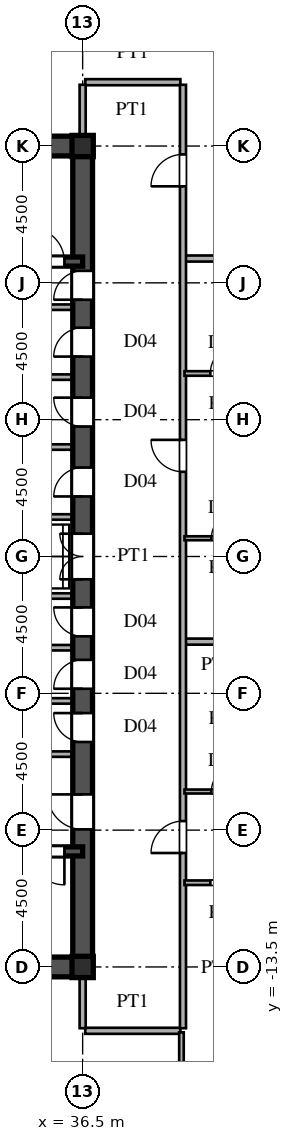
"""IFC4 building model, lengths in metres.
Left out: names, types, materials, properties, quantities, classifications, styles, units other than length and angle.
Written with IfcOpenShell. Run it as: python <this file> out.ifc"""

import sys

from ifc_helpers import new_model, si_unit, direction, frame, frame_2d, origin, origin_2d, place, context, subcontext, project, spatial, rectangle, i_section, extrude, source, transform, mapped, element, fill, save


model = new_model("IFC4")
c1 = context("Model", 3, precision=1e-05, world=origin(), true_north=direction((0.0, 1.0)))
c2 = subcontext(c1, "Body", "Model", "MODEL_VIEW")
j1 = project(units=[si_unit("LENGTHUNIT", "METRE"), si_unit("PLANEANGLEUNIT", "RADIAN")], contexts=[c1])
p1 = place(None, origin())
s1 = spatial("IfcSite", under=j1, at=p1, CompositionType="ELEMENT")
p2 = place(p1, origin())
s2 = spatial("IfcBuilding", under=s1, at=p2, CompositionType="ELEMENT")
p3 = place(p2, frame((0.0, 0.0, 124.8)))
s3 = spatial("IfcBuildingStorey", under=s2, at=p3, CompositionType="ELEMENT", Elevation=124.8)
m1 = source(origin(), c2, "Body", "SweptSolid", [
    extrude(i_section(OverallWidth=0.7, OverallDepth=0.7, WebThickness=0.028, FlangeThickness=0.045, at=origin_2d()), origin(), (0.0, 0.0, 1.0), 3.6),
])
for number, where, z_axis, x_axis in (
    (1, (36.5, -13.5, 0.0), (0.0, 0.0, 1.0), (1.0, 0.0, 0.0)),
    (2, (36.5, 13.5, 0.0), (0.0, 0.0, 1.0), (1.0, 0.0, 0.0)),
):
    element("IfcColumn", number, at=place(p3, frame(where, z_axis=z_axis, x_axis=x_axis)), inside=s3, PredefinedType="COLUMN", context=c2, shape_type="MappedRepresentation", body=[
        mapped(m1, transform((0.0, 0.0, 0.0), scale=1.0)),
    ])
for number, where, z_axis, x_axis in (
    (3, (27.5, -13.5, 0.0), (0.0, 0.0, 1.0), (1.0, 0.0, 0.0)),
    (4, (27.5, 13.5, 0.0), (0.0, 0.0, 1.0), (1.0, 0.0, 0.0)),
):
    element("IfcWall", number, at=place(p3, frame(where, z_axis=z_axis, x_axis=x_axis)), inside=s3, PredefinedType="SHEAR", context=c2, shape_type="SweptSolid", body=[
        extrude(rectangle(XDim=9.0, YDim=0.65, at=frame_2d((4.5, 0.0))), origin(), (0.0, 0.0, 1.0), 3.38),
    ])
p4 = place(p3, frame((36.5, -13.65, 0.0), z_axis=(0.0, 0.0, 1.0), x_axis=(0.0, 1.0, 0.0)))
e5 = element("IfcWall", 5, at=p4, inside=s3, PredefinedType="SHEAR", context=c2, shape_type="SweptSolid", body=[
    extrude(rectangle(XDim=7.15, YDim=0.65, at=frame_2d((3.575, 0.0))), origin(), (0.0, 0.0, 1.0), 3.38),
])
p5 = place(p4, frame((4.675, 0.0, 0.0)))
e6 = element("IfcOpeningElement", 6, at=p5, cuts=e5, PredefinedType="OPENING", context=c2, shape_type="SweptSolid", body=[
    extrude(rectangle(XDim=1.15, YDim=2.2, at=frame_2d((0.575, 1.1))), frame((0.0, 0.335, 0.0), z_axis=(0.0, -1.0, 0.0), x_axis=(1.0, 0.0, 0.0)), (0.0, 0.0, 1.0), 0.67),
])
p6 = place(p3, frame((36.5, -1.3, 0.0), z_axis=(0.0, 0.0, 1.0), x_axis=(0.0, 1.0, 0.0)))
e7 = element("IfcWall", 7, at=p6, inside=s3, PredefinedType="SHEAR", context=c2, shape_type="SweptSolid", body=[
    extrude(rectangle(XDim=2.6, YDim=0.65, at=frame_2d((1.3, 0.0))), origin(), (0.0, 0.0, 1.0), 3.38),
])
p7 = place(p6, frame((0.55, 0.0, 0.0)))
e8 = element("IfcOpeningElement", 8, at=p7, cuts=e7, PredefinedType="OPENING", context=c2, shape_type="SweptSolid", body=[
    extrude(rectangle(XDim=1.5, YDim=2.3, at=frame_2d((0.75, 1.15))), frame((0.0, 0.335, 0.0), z_axis=(0.0, -1.0, 0.0), x_axis=(1.0, 0.0, 0.0)), (0.0, 0.0, 1.0), 0.67),
])
p8 = place(p3, frame((36.5, 8.2, 0.0), z_axis=(0.0, 0.0, 1.0), x_axis=(0.0, 1.0, 0.0)))
e9 = element("IfcWall", 9, at=p8, inside=s3, PredefinedType="SHEAR", context=c2, shape_type="SweptSolid", body=[
    extrude(rectangle(XDim=5.45, YDim=0.65, at=frame_2d((2.725, 0.0))), origin(), (0.0, 0.0, 1.0), 3.38),
])
p9 = place(p8, frame((0.245, 0.0, 0.0)))
e10 = element("IfcOpeningElement", 10, at=p9, cuts=e9, PredefinedType="OPENING", context=c2, shape_type="SweptSolid", body=[
    extrude(rectangle(XDim=0.95, YDim=2.15, at=frame_2d((0.475, 1.075))), frame((0.0, 0.335, 0.0), z_axis=(0.0, -1.0, 0.0), x_axis=(1.0, 0.0, 0.0)), (0.0, 0.0, 1.0), 0.67),
])
p10 = place(p3, frame((36.5, -6.5, 0.0), z_axis=(0.0, 0.0, 1.0), x_axis=(0.0, 1.0, 0.0)))
e11 = element("IfcWall", 11, at=p10, inside=s3, PredefinedType="SHEAR", context=c2, shape_type="SweptSolid", body=[
    extrude(rectangle(XDim=1.75, YDim=0.65, at=frame_2d((0.875, 0.0))), origin(), (0.0, 0.0, 1.0), 3.38),
])
p11 = place(p10, frame((0.4, 0.0, 0.0)))
e12 = element("IfcOpeningElement", 12, at=p11, cuts=e11, PredefinedType="OPENING", context=c2, shape_type="SweptSolid", body=[
    extrude(rectangle(XDim=0.95, YDim=2.15, at=frame_2d((0.475, 1.075))), frame((0.0, 0.335, 0.0), z_axis=(0.0, -1.0, 0.0), x_axis=(1.0, 0.0, 0.0)), (0.0, 0.0, 1.0), 0.67),
])
p12 = place(p3, frame((36.5, -4.75, 0.0), z_axis=(0.0, 0.0, 1.0), x_axis=(0.0, 1.0, 0.0)))
e13 = element("IfcWall", 13, at=p12, inside=s3, PredefinedType="SHEAR", context=c2, shape_type="SweptSolid", body=[
    extrude(rectangle(XDim=1.75, YDim=0.65, at=frame_2d((0.875, 0.0))), origin(), (0.0, 0.0, 1.0), 3.38),
])
p13 = place(p12, frame((0.4, 0.0, 0.0)))
e14 = element("IfcOpeningElement", 14, at=p13, cuts=e13, PredefinedType="OPENING", context=c2, shape_type="SweptSolid", body=[
    extrude(rectangle(XDim=0.95, YDim=2.15, at=frame_2d((0.475, 1.075))), frame((0.0, 0.335, 0.0), z_axis=(0.0, -1.0, 0.0), x_axis=(1.0, 0.0, 0.0)), (0.0, 0.0, 1.0), 0.67),
])
p14 = place(p3, frame((36.5, -3.0, 0.0), z_axis=(0.0, 0.0, 1.0), x_axis=(0.0, 1.0, 0.0)))
e15 = element("IfcWall", 15, at=p14, inside=s3, PredefinedType="SHEAR", context=c2, shape_type="SweptSolid", body=[
    extrude(rectangle(XDim=1.7, YDim=0.65, at=frame_2d((0.85, 0.0))), origin(), (0.0, 0.0, 1.0), 3.38),
])
p15 = place(p14, frame((0.375, 0.0, 0.0)))
e16 = element("IfcOpeningElement", 16, at=p15, cuts=e15, PredefinedType="OPENING", context=c2, shape_type="SweptSolid", body=[
    extrude(rectangle(XDim=0.95, YDim=2.15, at=frame_2d((0.475, 1.075))), frame((0.0, 0.335, 0.0), z_axis=(0.0, -1.0, 0.0), x_axis=(1.0, 0.0, 0.0)), (0.0, 0.0, 1.0), 0.67),
])
p16 = place(p3, frame((36.5, 1.3, 0.0), z_axis=(0.0, 0.0, 1.0), x_axis=(0.0, 1.0, 0.0)))
e17 = element("IfcWall", 17, at=p16, inside=s3, PredefinedType="SHEAR", context=c2, shape_type="SweptSolid", body=[
    extrude(rectangle(XDim=2.3, YDim=0.65, at=frame_2d((1.15, 0.0))), origin(), (0.0, 0.0, 1.0), 3.38),
])
p17 = place(p16, frame((0.675, 0.0, 0.0)))
e18 = element("IfcOpeningElement", 18, at=p17, cuts=e17, PredefinedType="OPENING", context=c2, shape_type="SweptSolid", body=[
    extrude(rectangle(XDim=0.95, YDim=2.15, at=frame_2d((0.475, 1.075))), frame((0.0, 0.335, 0.0), z_axis=(0.0, -1.0, 0.0), x_axis=(1.0, 0.0, 0.0)), (0.0, 0.0, 1.0), 0.67),
])
p18 = place(p3, frame((36.5, 3.6, 0.0), z_axis=(0.0, 0.0, 1.0), x_axis=(0.0, 1.0, 0.0)))
e19 = element("IfcWall", 19, at=p18, inside=s3, PredefinedType="SHEAR", context=c2, shape_type="SweptSolid", body=[
    extrude(rectangle(XDim=2.3, YDim=0.65, at=frame_2d((1.15, 0.0))), origin(), (0.0, 0.0, 1.0), 3.38),
])
p19 = place(p18, frame((0.675, 0.0, 0.0)))
e20 = element("IfcOpeningElement", 20, at=p19, cuts=e19, PredefinedType="OPENING", context=c2, shape_type="SweptSolid", body=[
    extrude(rectangle(XDim=0.95, YDim=2.15, at=frame_2d((0.475, 1.075))), frame((0.0, 0.335, 0.0), z_axis=(0.0, -1.0, 0.0), x_axis=(1.0, 0.0, 0.0)), (0.0, 0.0, 1.0), 0.67),
])
p20 = place(p3, frame((36.5, 5.9, 0.0), z_axis=(0.0, 0.0, 1.0), x_axis=(0.0, 1.0, 0.0)))
e21 = element("IfcWall", 21, at=p20, inside=s3, PredefinedType="SHEAR", context=c2, shape_type="SweptSolid", body=[
    extrude(rectangle(XDim=2.3, YDim=0.65, at=frame_2d((1.15, 0.0))), origin(), (0.0, 0.0, 1.0), 3.38),
])
p21 = place(p20, frame((0.675, 0.0, 0.0)))
e22 = element("IfcOpeningElement", 22, at=p21, cuts=e21, PredefinedType="OPENING", context=c2, shape_type="SweptSolid", body=[
    extrude(rectangle(XDim=0.95, YDim=2.15, at=frame_2d((0.475, 1.075))), frame((0.0, 0.335, 0.0), z_axis=(0.0, -1.0, 0.0), x_axis=(1.0, 0.0, 0.0)), (0.0, 0.0, 1.0), 0.67),
])
p22 = place(p3, frame((27.5, -9.7, 0.0), z_axis=(0.0, 0.0, 1.0), x_axis=(1.0, 0.0, 0.0)))
e23 = element("IfcWall", 23, at=p22, inside=s3, PredefinedType="SHEAR", context=c2, shape_type="SweptSolid", body=[
    extrude(rectangle(XDim=9.0, YDim=0.3, at=frame_2d((4.5, 0.0))), origin(), (0.0, 0.0, 1.0), 3.38),
])
p23 = place(p22, frame((7.3, 0.0, 0.0)))
e24 = element("IfcOpeningElement", 24, at=p23, cuts=e23, PredefinedType="OPENING", context=c2, shape_type="SweptSolid", body=[
    extrude(rectangle(XDim=1.1, YDim=2.2, at=frame_2d((0.55, 1.1))), frame((0.0, 0.16, 0.0), z_axis=(0.0, -1.0, 0.0), x_axis=(1.0, 0.0, 0.0)), (0.0, 0.0, 1.0), 0.32),
])
p24 = place(p3, frame((27.5, 9.7, 0.0), z_axis=(0.0, 0.0, 1.0), x_axis=(1.0, 0.0, 0.0)))
e25 = element("IfcWall", 25, at=p24, inside=s3, PredefinedType="SHEAR", context=c2, shape_type="SweptSolid", body=[
    extrude(rectangle(XDim=9.0, YDim=0.3, at=frame_2d((4.5, 0.0))), origin(), (0.0, 0.0, 1.0), 3.38),
])
p25 = place(p24, frame((7.3, 0.0, 0.0)))
e26 = element("IfcOpeningElement", 26, at=p25, cuts=e25, PredefinedType="OPENING", context=c2, shape_type="SweptSolid", body=[
    extrude(rectangle(XDim=1.1, YDim=2.2, at=frame_2d((0.55, 1.1))), frame((0.0, 0.16, 0.0), z_axis=(0.0, -1.0, 0.0), x_axis=(1.0, 0.0, 0.0)), (0.0, 0.0, 1.0), 0.32),
])
for number, where, z_axis, x_axis in (
    (27, (30.45, -6.5, 0.0), (0.0, 0.0, 1.0), (1.0, 0.0, 0.0)),
    (28, (30.45, 8.2, 0.0), (0.0, 0.0, 1.0), (1.0, 0.0, 0.0)),
):
    element("IfcWall", number, at=place(p3, frame(where, z_axis=z_axis, x_axis=x_axis)), inside=s3, PredefinedType="PARTITIONING", context=c2, shape_type="SweptSolid", body=[
        extrude(rectangle(XDim=5.7, YDim=0.18, at=frame_2d((2.85, 0.0))), origin(), (0.0, 0.0, 1.0), 3.38),
    ])
for number, where, z_axis, x_axis in (
    (29, (33.2, -1.3, 0.0), (0.0, 0.0, 1.0), (1.0, 0.0, 0.0)),
    (30, (33.2, 1.3, 0.0), (0.0, 0.0, 1.0), (1.0, 0.0, 0.0)),
    (31, (33.2, -4.75, 0.0), (0.0, 0.0, 1.0), (1.0, 0.0, 0.0)),
    (32, (33.2, -3.0, 0.0), (0.0, 0.0, 1.0), (1.0, 0.0, 0.0)),
    (33, (33.2, 3.6, 0.0), (0.0, 0.0, 1.0), (1.0, 0.0, 0.0)),
    (34, (33.2, 5.9, 0.0), (0.0, 0.0, 1.0), (1.0, 0.0, 0.0)),
):
    element("IfcWall", number, at=place(p3, frame(where, z_axis=z_axis, x_axis=x_axis)), inside=s3, PredefinedType="PARTITIONING", context=c2, shape_type="SweptSolid", body=[
        extrude(rectangle(XDim=2.95, YDim=0.18, at=frame_2d((1.475, 0.0))), origin(), (0.0, 0.0, 1.0), 3.38),
    ])
p26 = place(p3, frame((36.585, -15.6, 0.0), z_axis=(0.0, 0.0, 1.0), x_axis=(1.0, 0.0, 0.0)))
e35 = element("IfcWall", 35, at=p26, inside=s3, PredefinedType="PARTITIONING", context=c2, shape_type="SweptSolid", body=[
    extrude(rectangle(XDim=3.13, YDim=0.2, at=frame_2d((1.565, 0.0))), origin(), (0.0, 0.0, 1.0), 3.38),
])
p27 = place(p3, frame((39.85, -10.73, 0.0), z_axis=(0.0, 0.0, 1.0), x_axis=(1.0, 0.0, 0.0)))
e36 = element("IfcWall", 36, at=p27, inside=s3, PredefinedType="PARTITIONING", context=c2, shape_type="SweptSolid", body=[
    extrude(rectangle(XDim=2.65, YDim=0.15, at=frame_2d((1.325, 0.0))), origin(), (0.0, 0.0, 1.0), 3.38),
])
p28 = place(p27, frame((0.85, 0.0, 0.0)))
e37 = element("IfcOpeningElement", 37, at=p28, cuts=e36, PredefinedType="OPENING", context=c2, shape_type="SweptSolid", body=[
    extrude(rectangle(XDim=0.95, YDim=2.15, at=frame_2d((0.475, 1.075))), frame((0.0, 0.085, 0.0), z_axis=(0.0, -1.0, 0.0), x_axis=(1.0, 0.0, 0.0)), (0.0, 0.0, 1.0), 0.17),
])
p29 = place(p3, frame((39.85, -7.73, 0.0), z_axis=(0.0, 0.0, 1.0), x_axis=(1.0, 0.0, 0.0)))
e38 = element("IfcWall", 38, at=p29, inside=s3, PredefinedType="PARTITIONING", context=c2, shape_type="SweptSolid", body=[
    extrude(rectangle(XDim=2.65, YDim=0.13, at=frame_2d((1.325, 0.0))), origin(), (0.0, 0.0, 1.0), 3.38),
])
p30 = place(p29, frame((0.885, 0.0, 0.0)))
e39 = element("IfcOpeningElement", 39, at=p30, cuts=e38, PredefinedType="OPENING", context=c2, shape_type="SweptSolid", body=[
    extrude(rectangle(XDim=0.88, YDim=2.1, at=frame_2d((0.44, 1.05))), frame((0.0, 0.075, 0.0), z_axis=(0.0, -1.0, 0.0), x_axis=(1.0, 0.0, 0.0)), (0.0, 0.0, 1.0), 0.15),
])
p31 = place(p3, frame((39.88, -2.8, 0.0), z_axis=(0.0, 0.0, 1.0), x_axis=(1.0, 0.0, 0.0)))
e40 = element("IfcWall", 40, at=p31, inside=s3, PredefinedType="PARTITIONING", context=c2, shape_type="SweptSolid", body=[
    extrude(rectangle(XDim=29.625, YDim=0.2, at=frame_2d((14.812, 0.0))), origin(), (0.0, 0.0, 1.0), 3.38),
])
p32 = place(p3, frame((39.85, 0.6, 0.0), z_axis=(0.0, 0.0, 1.0), x_axis=(1.0, 0.0, 0.0)))
e41 = element("IfcWall", 41, at=p32, inside=s3, PredefinedType="PARTITIONING", context=c2, shape_type="SweptSolid", body=[
    extrude(rectangle(XDim=2.65, YDim=0.13, at=frame_2d((1.325, 0.0))), origin(), (0.0, 0.0, 1.0), 3.38),
])
p33 = place(p32, frame((0.885, 0.0, 0.0)))
e42 = element("IfcOpeningElement", 42, at=p33, cuts=e41, PredefinedType="OPENING", context=c2, shape_type="SweptSolid", body=[
    extrude(rectangle(XDim=0.88, YDim=2.1, at=frame_2d((0.44, 1.05))), frame((0.0, 0.075, 0.0), z_axis=(0.0, -1.0, 0.0), x_axis=(1.0, 0.0, 0.0)), (0.0, 0.0, 1.0), 0.15),
])
p34 = place(p3, frame((39.85, 6.02, 0.0), z_axis=(0.0, 0.0, 1.0), x_axis=(1.0, 0.0, 0.0)))
e43 = element("IfcWall", 43, at=p34, inside=s3, PredefinedType="PARTITIONING", context=c2, shape_type="SweptSolid", body=[
    extrude(rectangle(XDim=2.65, YDim=0.15, at=frame_2d((1.325, 0.0))), origin(), (0.0, 0.0, 1.0), 3.38),
])
p35 = place(p34, frame((0.85, 0.0, 0.0)))
e44 = element("IfcOpeningElement", 44, at=p35, cuts=e43, PredefinedType="OPENING", context=c2, shape_type="SweptSolid", body=[
    extrude(rectangle(XDim=0.95, YDim=2.15, at=frame_2d((0.475, 1.075))), frame((0.0, 0.085, 0.0), z_axis=(0.0, -1.0, 0.0), x_axis=(1.0, 0.0, 0.0)), (0.0, 0.0, 1.0), 0.17),
])
p36 = place(p3, frame((39.88, 9.8, 0.0), z_axis=(0.0, 0.0, 1.0), x_axis=(1.0, 0.0, 0.0)))
e45 = element("IfcWall", 45, at=p36, inside=s3, PredefinedType="PARTITIONING", context=c2, shape_type="SweptSolid", body=[
    extrude(rectangle(XDim=20.277, YDim=0.2, at=frame_2d((10.139, 0.0))), origin(), (0.0, 0.0, 1.0), 3.38),
])
p37 = place(p3, frame((36.585, 15.6, 0.0), z_axis=(0.0, 0.0, 1.0), x_axis=(1.0, 0.0, 0.0)))
e46 = element("IfcWall", 46, at=p37, inside=s3, PredefinedType="PARTITIONING", context=c2, shape_type="SweptSolid", body=[
    extrude(rectangle(XDim=3.13, YDim=0.2, at=frame_2d((1.565, 0.0))), origin(), (0.0, 0.0, 1.0), 3.38),
])
for number, where, z_axis, x_axis in (
    (47, (36.5, -15.515, 0.0), (0.0, 0.0, 1.0), (0.0, 1.0, 0.0)),
    (48, (36.5, 13.83, 0.0), (0.0, 0.0, 1.0), (0.0, 1.0, 0.0)),
):
    element("IfcWall", number, at=place(p3, frame(where, z_axis=z_axis, x_axis=x_axis)), inside=s3, PredefinedType="PARTITIONING", context=c2, shape_type="SweptSolid", body=[
        extrude(rectangle(XDim=1.685, YDim=0.2, at=frame_2d((0.842, 0.0))), origin(), (0.0, 0.0, 1.0), 2.78),
    ])
p38 = place(p3, frame((39.75, -20.301, 0.0), z_axis=(0.0, 0.0, 1.0), x_axis=(0.0, 1.0, 0.0)))
e49 = element("IfcWall", 49, at=p38, inside=s3, PredefinedType="PARTITIONING", context=c2, shape_type="SweptSolid", body=[
    extrude(rectangle(XDim=4.651, YDim=0.15, at=frame_2d((2.326, 0.0))), origin(), (0.0, 0.0, 1.0), 3.38),
])
p39 = place(p38, frame((2.526, 0.0, 0.0)))
e50 = element("IfcOpeningElement", 50, at=p39, cuts=e49, PredefinedType="OPENING", context=c2, shape_type="SweptSolid", body=[
    extrude(rectangle(XDim=0.95, YDim=2.15, at=frame_2d((0.475, 1.075))), frame((0.0, 0.085, 0.0), z_axis=(0.0, -1.0, 0.0), x_axis=(1.0, 0.0, 0.0)), (0.0, 0.0, 1.0), 0.17),
])
p40 = place(p3, frame((39.8, -15.515, 0.0), z_axis=(0.0, 0.0, 1.0), x_axis=(0.0, 1.0, 0.0)))
e51 = element("IfcWall", 51, at=p40, inside=s3, PredefinedType="PARTITIONING", context=c2, shape_type="SweptSolid", body=[
    extrude(rectangle(XDim=31.03, YDim=0.2, at=frame_2d((15.515, 0.0))), origin(), (0.0, 0.0, 1.0), 3.38),
])
p41 = place(p40, frame((5.762, 0.0, 0.0)))
e52 = element("IfcOpeningElement", 52, at=p41, cuts=e51, PredefinedType="OPENING", context=c2, shape_type="SweptSolid", body=[
    extrude(rectangle(XDim=1.05, YDim=2.25, at=frame_2d((0.525, 1.125))), frame((0.0, 0.11, 0.0), z_axis=(0.0, -1.0, 0.0), x_axis=(1.0, 0.0, 0.0)), (0.0, 0.0, 1.0), 0.22),
])
p42 = place(p40, frame((18.301, 0.0, 0.0)))
e53 = element("IfcOpeningElement", 53, at=p42, cuts=e51, PredefinedType="OPENING", context=c2, shape_type="SweptSolid", body=[
    extrude(rectangle(XDim=1.05, YDim=2.25, at=frame_2d((0.525, 1.125))), frame((0.0, 0.11, 0.0), z_axis=(0.0, -1.0, 0.0), x_axis=(1.0, 0.0, 0.0)), (0.0, 0.0, 1.0), 0.22),
])
p43 = place(p40, frame((27.69, 0.0, 0.0)))
e54 = element("IfcOpeningElement", 54, at=p43, cuts=e51, PredefinedType="OPENING", context=c2, shape_type="SweptSolid", body=[
    extrude(rectangle(XDim=1.05, YDim=2.25, at=frame_2d((0.525, 1.125))), frame((0.0, 0.11, 0.0), z_axis=(0.0, -1.0, 0.0), x_axis=(1.0, 0.0, 0.0)), (0.0, 0.0, 1.0), 0.22),
])
m2 = source(origin(), c2, "Body", "SweptSolid", [
    extrude(rectangle(XDim=1.15, YDim=2.2, at=frame_2d((0.575, 1.1))), frame((0.0, 0.025, 0.0), z_axis=(0.0, -1.0, 0.0), x_axis=(1.0, 0.0, 0.0)), (0.0, 0.0, 1.0), 0.05),
])
p44 = place(p5, origin())
e55 = element("IfcDoor", 55, at=p44, inside=s3, OperationType="SINGLE_SWING_RIGHT", PredefinedType="DOOR", context=c2, shape_type="MappedRepresentation", body=[
    mapped(m2, transform((0.0, 0.0, 0.0), scale=1.0)),
])
fill(e6, e55)
m3 = source(origin(), c2, "Body", "SweptSolid", [
    extrude(rectangle(XDim=1.5, YDim=2.3, at=frame_2d((0.75, 1.15))), frame((0.0, 0.025, 0.0), z_axis=(0.0, -1.0, 0.0), x_axis=(1.0, 0.0, 0.0)), (0.0, 0.0, 1.0), 0.05),
])
p45 = place(p7, origin())
e56 = element("IfcDoor", 56, at=p45, inside=s3, OperationType="DOUBLE_SWING_LEFT", PredefinedType="DOOR", context=c2, shape_type="MappedRepresentation", body=[
    mapped(m3, transform((0.0, 0.0, 0.0), scale=1.0)),
])
fill(e8, e56)
m4 = source(origin(), c2, "Body", "SweptSolid", [
    extrude(rectangle(XDim=0.95, YDim=2.15, at=frame_2d((0.475, 1.075))), frame((0.0, 0.025, 0.0), z_axis=(0.0, -1.0, 0.0), x_axis=(1.0, 0.0, 0.0)), (0.0, 0.0, 1.0), 0.05),
])
p46 = place(p9, origin())
e57 = element("IfcDoor", 57, at=p46, inside=s3, OperationType="SINGLE_SWING_LEFT", PredefinedType="DOOR", context=c2, shape_type="MappedRepresentation", body=[
    mapped(m4, transform((0.0, 0.0, 0.0), scale=1.0)),
])
fill(e10, e57)
p47 = place(p11, origin())
e58 = element("IfcDoor", 58, at=p47, inside=s3, OperationType="SINGLE_SWING_RIGHT", PredefinedType="DOOR", context=c2, shape_type="MappedRepresentation", body=[
    mapped(m4, transform((0.0, 0.0, 0.0), scale=1.0)),
])
fill(e12, e58)
p48 = place(p13, origin())
e59 = element("IfcDoor", 59, at=p48, inside=s3, OperationType="SINGLE_SWING_LEFT", PredefinedType="DOOR", context=c2, shape_type="MappedRepresentation", body=[
    mapped(m4, transform((0.0, 0.0, 0.0), scale=1.0)),
])
fill(e14, e59)
p49 = place(p15, origin())
e60 = element("IfcDoor", 60, at=p49, inside=s3, OperationType="SINGLE_SWING_RIGHT", PredefinedType="DOOR", context=c2, shape_type="MappedRepresentation", body=[
    mapped(m4, transform((0.0, 0.0, 0.0), scale=1.0)),
])
fill(e16, e60)
p50 = place(p17, origin())
e61 = element("IfcDoor", 61, at=p50, inside=s3, OperationType="SINGLE_SWING_LEFT", PredefinedType="DOOR", context=c2, shape_type="MappedRepresentation", body=[
    mapped(m4, transform((0.0, 0.0, 0.0), scale=1.0)),
])
fill(e18, e61)
p51 = place(p19, origin())
e62 = element("IfcDoor", 62, at=p51, inside=s3, OperationType="SINGLE_SWING_RIGHT", PredefinedType="DOOR", context=c2, shape_type="MappedRepresentation", body=[
    mapped(m4, transform((0.0, 0.0, 0.0), scale=1.0)),
])
fill(e20, e62)
p52 = place(p21, origin())
e63 = element("IfcDoor", 63, at=p52, inside=s3, OperationType="SINGLE_SWING_LEFT", PredefinedType="DOOR", context=c2, shape_type="MappedRepresentation", body=[
    mapped(m4, transform((0.0, 0.0, 0.0), scale=1.0)),
])
fill(e22, e63)
m5 = source(origin(), c2, "Body", "SweptSolid", [
    extrude(rectangle(XDim=1.1, YDim=2.2, at=frame_2d((0.55, 1.1))), frame((0.0, 0.025, 0.0), z_axis=(0.0, -1.0, 0.0), x_axis=(1.0, 0.0, 0.0)), (0.0, 0.0, 1.0), 0.05),
])
p53 = place(p23, frame((1.1, 0.0, 0.0), z_axis=(0.0, 0.0, 1.0), x_axis=(-1.0, 0.0, 0.0)))
e64 = element("IfcDoor", 64, at=p53, inside=s3, OperationType="SINGLE_SWING_RIGHT", PredefinedType="DOOR", context=c2, shape_type="MappedRepresentation", body=[
    mapped(m5, transform((0.0, 0.0, 0.0), scale=1.0)),
])
fill(e24, e64)
p54 = place(p25, origin())
e65 = element("IfcDoor", 65, at=p54, inside=s3, OperationType="SINGLE_SWING_LEFT", PredefinedType="DOOR", context=c2, shape_type="MappedRepresentation", body=[
    mapped(m5, transform((0.0, 0.0, 0.0), scale=1.0)),
])
fill(e26, e65)
m6 = source(origin(), c2, "Body", "SweptSolid", [
    extrude(rectangle(XDim=0.88, YDim=2.1, at=frame_2d((0.44, 1.05))), frame((0.0, 0.025, 0.0), z_axis=(0.0, -1.0, 0.0), x_axis=(1.0, 0.0, 0.0)), (0.0, 0.0, 1.0), 0.05),
])
p55 = place(p30, origin())
e66 = element("IfcDoor", 66, at=p55, inside=s3, OperationType="SINGLE_SWING_RIGHT", PredefinedType="DOOR", context=c2, shape_type="MappedRepresentation", body=[
    mapped(m6, transform((0.0, 0.0, 0.0), scale=1.0)),
])
fill(e39, e66)
p56 = place(p33, origin())
e67 = element("IfcDoor", 67, at=p56, inside=s3, OperationType="SINGLE_SWING_RIGHT", PredefinedType="DOOR", context=c2, shape_type="MappedRepresentation", body=[
    mapped(m6, transform((0.0, 0.0, 0.0), scale=1.0)),
])
fill(e42, e67)
m7 = source(origin(), c2, "Body", "SweptSolid", [
    extrude(rectangle(XDim=0.95, YDim=2.15, at=frame_2d((0.475, 1.075))), frame((0.0, 0.025, 0.0), z_axis=(0.0, -1.0, 0.0), x_axis=(1.0, 0.0, 0.0)), (0.0, 0.0, 1.0), 0.05),
])
p57 = place(p35, origin())
e68 = element("IfcDoor", 68, at=p57, inside=s3, OperationType="SINGLE_SWING_RIGHT", PredefinedType="DOOR", context=c2, shape_type="MappedRepresentation", body=[
    mapped(m7, transform((0.0, 0.0, 0.0), scale=1.0)),
])
fill(e44, e68)
m8 = source(origin(), c2, "Body", "SweptSolid", [
    extrude(rectangle(XDim=1.05, YDim=2.25, at=frame_2d((0.525, 1.125))), frame((0.0, 0.025, 0.0), z_axis=(0.0, -1.0, 0.0), x_axis=(1.0, 0.0, 0.0)), (0.0, 0.0, 1.0), 0.05),
])
p58 = place(p41, origin())
e69 = element("IfcDoor", 69, at=p58, inside=s3, OperationType="SINGLE_SWING_LEFT", PredefinedType="DOOR", context=c2, shape_type="MappedRepresentation", body=[
    mapped(m8, transform((0.0, 0.0, 0.0), scale=1.0)),
])
fill(e52, e69)
p59 = place(p42, origin())
e70 = element("IfcDoor", 70, at=p59, inside=s3, OperationType="SINGLE_SWING_RIGHT", PredefinedType="DOOR", context=c2, shape_type="MappedRepresentation", body=[
    mapped(m8, transform((0.0, 0.0, 0.0), scale=1.0)),
])
fill(e53, e70)
p60 = place(p43, origin())
e71 = element("IfcDoor", 71, at=p60, inside=s3, OperationType="SINGLE_SWING_LEFT", PredefinedType="DOOR", context=c2, shape_type="MappedRepresentation", body=[
    mapped(m8, transform((0.0, 0.0, 0.0), scale=1.0)),
])
fill(e54, e71)
save(model, sys.argv[1])
